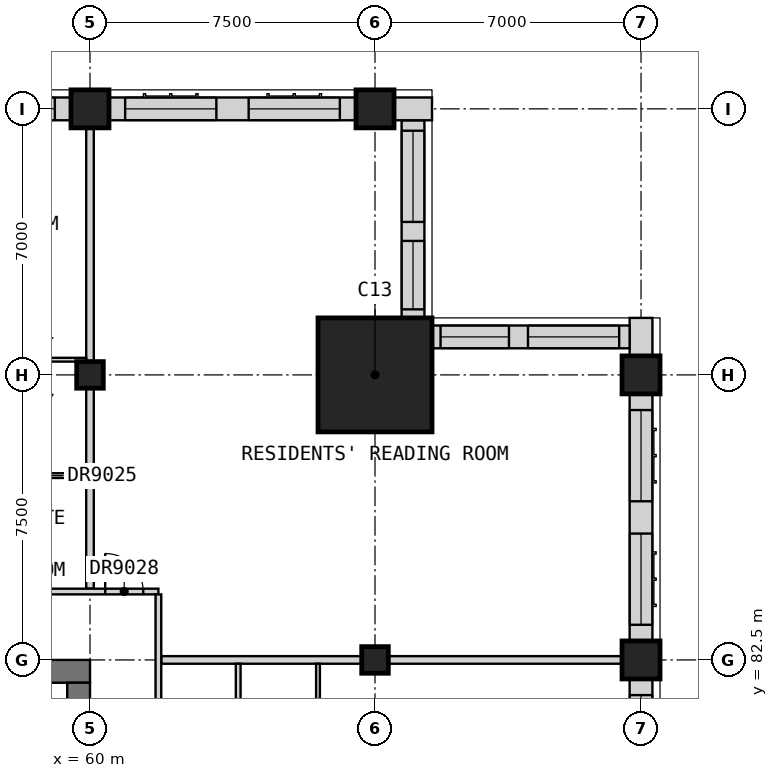
"""IFC4 building model, lengths in metres.
Left out: names, types, materials, properties, quantities, classifications, styles, units other than length and angle.
Written with IfcOpenShell. Run it as: python <this file> out.ifc"""

import sys

from ifc_helpers import new_model, si_unit, direction, frame, frame_2d, origin, origin_2d, place, context, subcontext, project, spatial, rectangle, extrude, element, fill, save


model = new_model("IFC4")
c1 = context("Model", 3, precision=1e-05, world=origin(), true_north=direction((0.0, 1.0)))
c2 = subcontext(c1, "Body", "Model", "MODEL_VIEW")
j1 = project(units=[si_unit("LENGTHUNIT", "METRE"), si_unit("PLANEANGLEUNIT", "RADIAN")], contexts=[c1])
p1 = place(None, origin())
s1 = spatial("IfcSite", under=j1, at=p1, CompositionType="ELEMENT")
p2 = place(p1, origin())
s2 = spatial("IfcBuilding", under=s1, at=p2, CompositionType="ELEMENT")
p3 = place(p2, frame((0.0, 0.0, 269.7)))
s3 = spatial("IfcBuildingStorey", under=s2, at=p3, CompositionType="ELEMENT", Elevation=269.7)
p4 = place(p3, frame((60.0, 90.0, 0.0), z_axis=(0.0, 0.0, 1.0), x_axis=(1.0, 0.0, 0.0)))
e1 = element("IfcColumn", 1, at=p4, inside=s3, PredefinedType="COLUMN", context=c2, shape_type="SweptSolid", body=[
    extrude(rectangle(XDim=0.7, YDim=0.7, at=origin_2d()), origin(), (0.0, 0.0, 1.0), 3.5),
])
p5 = place(p3, frame((60.0, 97.0, 0.0), z_axis=(0.0, 0.0, 1.0), x_axis=(1.0, 0.0, 0.0)))
e2 = element("IfcColumn", 2, at=p5, inside=s3, PredefinedType="COLUMN", context=c2, shape_type="SweptSolid", body=[
    extrude(rectangle(XDim=1.0, YDim=1.0, at=origin_2d()), origin(), (0.0, 0.0, 1.0), 3.5),
])
p6 = place(p3, frame((67.5, 82.5, 0.0), z_axis=(0.0, 0.0, 1.0), x_axis=(1.0, 0.0, 0.0)))
e3 = element("IfcColumn", 3, at=p6, inside=s3, PredefinedType="COLUMN", context=c2, shape_type="SweptSolid", body=[
    extrude(rectangle(XDim=0.7, YDim=0.7, at=origin_2d()), origin(), (0.0, 0.0, 1.0), 3.5),
])
for number, where, z_axis, x_axis in (
    (4, (67.5, 97.0, 0.0), (0.0, 0.0, 1.0), (1.0, 0.0, 0.0)),
    (5, (74.5, 82.5, 0.0), (0.0, 0.0, 1.0), (1.0, 0.0, 0.0)),
    (6, (74.5, 90.0, 0.0), (0.0, 0.0, 1.0), (1.0, 0.0, 0.0)),
):
    element("IfcColumn", number, at=place(p3, frame(where, z_axis=z_axis, x_axis=x_axis)), inside=s3, PredefinedType="COLUMN", context=c2, shape_type="SweptSolid", body=[
        extrude(rectangle(XDim=1.0, YDim=1.0, at=origin_2d()), origin(), (0.0, 0.0, 1.0), 3.5),
    ])
p7 = place(p3, frame((67.5, 90.0, 0.0), z_axis=(0.0, 0.0, 1.0), x_axis=(1.0, 0.0, 0.0)))
e7 = element("IfcColumn", 7, at=p7, inside=s3, PredefinedType="COLUMN", context=c2, shape_type="SweptSolid", body=[
    extrude(rectangle(XDim=3.0, YDim=3.0, at=origin_2d()), origin(), (0.0, 0.0, 1.0), 3.5),
])
p8 = place(p3, frame((30.0, 82.2, 0.0), z_axis=(0.0, 0.0, 1.0), x_axis=(1.0, 0.0, 0.0)))
e8 = element("IfcWall", 8, at=p8, inside=s3, PredefinedType="SHEAR", context=c2, shape_type="SweptSolid", body=[
    extrude(rectangle(XDim=30.0, YDim=0.6, at=frame_2d((15.0, 0.0))), origin(), (0.0, 0.0, 1.0), 3.5),
])
p9 = place(p3, frame((59.7, 60.6, 0.0), z_axis=(0.0, 0.0, 1.0), x_axis=(0.0, 1.0, 0.0)))
e9 = element("IfcWall", 9, at=p9, inside=s3, PredefinedType="SHEAR", context=c2, shape_type="SweptSolid", body=[
    extrude(rectangle(XDim=21.3, YDim=0.6, at=frame_2d((10.65, 0.0))), origin(), (0.0, 0.0, 1.0), 3.5),
])
p10 = place(p9, frame((14.9, 0.0, 0.0)))
e10 = element("IfcOpeningElement", 10, at=p10, cuts=e9, PredefinedType="OPENING", context=c2, shape_type="SweptSolid", body=[
    extrude(rectangle(XDim=1.8, YDim=2.1, at=frame_2d((0.9, 1.05))), frame((0.0, 0.31, 0.0), z_axis=(0.0, -1.0, 0.0), x_axis=(1.0, 0.0, 0.0)), (0.0, 0.0, 1.0), 0.62),
])
p11 = place(p3, frame((74.5, 75.5, 0.0), z_axis=(0.0, 0.0, 1.0), x_axis=(0.0, 1.0, 0.0)))
e11 = element("IfcWall", 11, at=p11, inside=s3, PredefinedType="SOLIDWALL", context=c2, shape_type="SweptSolid", body=[
    extrude(rectangle(XDim=6.5, YDim=0.6, at=frame_2d((3.25, 0.0))), origin(), (0.0, 0.0, 1.0), 2.75),
])
p12 = place(p11, frame((0.425, 0.0, 0.8)))
e12 = element("IfcOpeningElement", 12, at=p12, cuts=e11, PredefinedType="OPENING", context=c2, shape_type="SweptSolid", body=[
    extrude(rectangle(XDim=2.4, YDim=1.8, at=frame_2d((1.2, 0.9))), frame((0.0, 0.31, 0.0), z_axis=(0.0, -1.0, 0.0), x_axis=(1.0, 0.0, 0.0)), (0.0, 0.0, 1.0), 0.62),
])
p13 = place(p11, frame((3.675, 0.0, 0.8)))
e13 = element("IfcOpeningElement", 13, at=p13, cuts=e11, PredefinedType="OPENING", context=c2, shape_type="SweptSolid", body=[
    extrude(rectangle(XDim=2.4, YDim=1.8, at=frame_2d((1.2, 0.9))), frame((0.0, 0.31, 0.0), z_axis=(0.0, -1.0, 0.0), x_axis=(1.0, 0.0, 0.0)), (0.0, 0.0, 1.0), 0.62),
])
p14 = place(p3, frame((74.5, 83.0, 0.0), z_axis=(0.0, 0.0, 1.0), x_axis=(0.0, 1.0, 0.0)))
e14 = element("IfcWall", 14, at=p14, inside=s3, PredefinedType="SOLIDWALL", context=c2, shape_type="SweptSolid", body=[
    extrude(rectangle(XDim=6.5, YDim=0.6, at=frame_2d((3.25, 0.0))), origin(), (0.0, 0.0, 1.0), 2.75),
])
p15 = place(p14, frame((0.425, 0.0, 0.8)))
e15 = element("IfcOpeningElement", 15, at=p15, cuts=e14, PredefinedType="OPENING", context=c2, shape_type="SweptSolid", body=[
    extrude(rectangle(XDim=2.4, YDim=1.8, at=frame_2d((1.2, 0.9))), frame((0.0, 0.31, 0.0), z_axis=(0.0, -1.0, 0.0), x_axis=(1.0, 0.0, 0.0)), (0.0, 0.0, 1.0), 0.62),
])
p16 = place(p14, frame((3.675, 0.0, 0.8)))
e16 = element("IfcOpeningElement", 16, at=p16, cuts=e14, PredefinedType="OPENING", context=c2, shape_type="SweptSolid", body=[
    extrude(rectangle(XDim=2.4, YDim=1.8, at=frame_2d((1.2, 0.9))), frame((0.0, 0.31, 0.0), z_axis=(0.0, -1.0, 0.0), x_axis=(1.0, 0.0, 0.0)), (0.0, 0.0, 1.0), 0.62),
])
p17 = place(p3, frame((74.5, 90.5, 0.0), z_axis=(0.0, 0.0, 1.0), x_axis=(0.0, 1.0, 0.0)))
e17 = element("IfcWall", 17, at=p17, inside=s3, PredefinedType="SOLIDWALL", context=c2, shape_type="SweptSolid", body=[
    extrude(rectangle(XDim=1.0, YDim=0.6, at=frame_2d((0.5, 0.0))), origin(), (0.0, 0.0, 1.0), 3.25),
])
p18 = place(p3, frame((74.2, 91.0, 0.0), z_axis=(0.0, 0.0, 1.0), x_axis=(-1.0, 0.0, 0.0)))
e18 = element("IfcWall", 18, at=p18, inside=s3, PredefinedType="SOLIDWALL", context=c2, shape_type="SweptSolid", body=[
    extrude(rectangle(XDim=5.2, YDim=0.6, at=frame_2d((2.6, 0.0))), origin(), (0.0, 0.0, 1.0), 3.25),
])
p19 = place(p18, frame((3.175, 0.0, 0.8)))
e19 = element("IfcOpeningElement", 19, at=p19, cuts=e18, PredefinedType="OPENING", context=c2, shape_type="SweptSolid", body=[
    extrude(rectangle(XDim=1.8, YDim=1.8, at=frame_2d((0.9, 0.9))), frame((0.0, 0.31, 0.0), z_axis=(0.0, -1.0, 0.0), x_axis=(1.0, 0.0, 0.0)), (0.0, 0.0, 1.0), 0.62),
])
p20 = place(p18, frame((0.275, 0.0, 0.8)))
e20 = element("IfcOpeningElement", 20, at=p20, cuts=e18, PredefinedType="OPENING", context=c2, shape_type="SweptSolid", body=[
    extrude(rectangle(XDim=2.4, YDim=1.8, at=frame_2d((1.2, 0.9))), frame((0.0, 0.31, 0.0), z_axis=(0.0, -1.0, 0.0), x_axis=(1.0, 0.0, 0.0)), (0.0, 0.0, 1.0), 0.62),
])
p21 = place(p3, frame((68.5, 91.5, 0.0), z_axis=(0.0, 0.0, 1.0), x_axis=(0.0, 1.0, 0.0)))
e21 = element("IfcWall", 21, at=p21, inside=s3, PredefinedType="SOLIDWALL", context=c2, shape_type="SweptSolid", body=[
    extrude(rectangle(XDim=5.2, YDim=0.6, at=frame_2d((2.6, 0.0))), origin(), (0.0, 0.0, 1.0), 3.25),
])
p22 = place(p21, frame((0.225, 0.0, 0.8)))
e22 = element("IfcOpeningElement", 22, at=p22, cuts=e21, PredefinedType="OPENING", context=c2, shape_type="SweptSolid", body=[
    extrude(rectangle(XDim=1.8, YDim=1.8, at=frame_2d((0.9, 0.9))), frame((0.0, 0.31, 0.0), z_axis=(0.0, -1.0, 0.0), x_axis=(1.0, 0.0, 0.0)), (0.0, 0.0, 1.0), 0.62),
])
p23 = place(p21, frame((2.525, 0.0, 0.8)))
e23 = element("IfcOpeningElement", 23, at=p23, cuts=e21, PredefinedType="OPENING", context=c2, shape_type="SweptSolid", body=[
    extrude(rectangle(XDim=2.4, YDim=1.8, at=frame_2d((1.2, 0.9))), frame((0.0, 0.31, 0.0), z_axis=(0.0, -1.0, 0.0), x_axis=(1.0, 0.0, 0.0)), (0.0, 0.0, 1.0), 0.62),
])
p24 = place(p3, frame((69.0, 97.0, 0.0), z_axis=(0.0, 0.0, 1.0), x_axis=(-1.0, 0.0, 0.0)))
e24 = element("IfcWall", 24, at=p24, inside=s3, PredefinedType="SOLIDWALL", context=c2, shape_type="SweptSolid", body=[
    extrude(rectangle(XDim=1.0, YDim=0.6, at=frame_2d((0.5, 0.0))), origin(), (0.0, 0.0, 1.0), 3.25),
])
p25 = place(p3, frame((67.0, 97.0, 0.0), z_axis=(0.0, 0.0, 1.0), x_axis=(-1.0, 0.0, 0.0)))
e25 = element("IfcWall", 25, at=p25, inside=s3, PredefinedType="SOLIDWALL", context=c2, shape_type="SweptSolid", body=[
    extrude(rectangle(XDim=6.5, YDim=0.6, at=frame_2d((3.25, 0.0))), origin(), (0.0, 0.0, 1.0), 2.75),
])
p26 = place(p25, frame((3.675, 0.0, 0.8)))
e26 = element("IfcOpeningElement", 26, at=p26, cuts=e25, PredefinedType="OPENING", context=c2, shape_type="SweptSolid", body=[
    extrude(rectangle(XDim=2.4, YDim=1.8, at=frame_2d((1.2, 0.9))), frame((0.0, 0.31, 0.0), z_axis=(0.0, -1.0, 0.0), x_axis=(1.0, 0.0, 0.0)), (0.0, 0.0, 1.0), 0.62),
])
p27 = place(p25, frame((0.425, 0.0, 0.8)))
e27 = element("IfcOpeningElement", 27, at=p27, cuts=e25, PredefinedType="OPENING", context=c2, shape_type="SweptSolid", body=[
    extrude(rectangle(XDim=2.4, YDim=1.8, at=frame_2d((1.2, 0.9))), frame((0.0, 0.31, 0.0), z_axis=(0.0, -1.0, 0.0), x_axis=(1.0, 0.0, 0.0)), (0.0, 0.0, 1.0), 0.62),
])
p28 = place(p3, frame((59.5, 97.0, 0.0), z_axis=(0.0, 0.0, 1.0), x_axis=(-1.0, 0.0, 0.0)))
e28 = element("IfcWall", 28, at=p28, inside=s3, PredefinedType="SOLIDWALL", context=c2, shape_type="SweptSolid", body=[
    extrude(rectangle(XDim=6.5, YDim=0.6, at=frame_2d((3.25, 0.0))), origin(), (0.0, 0.0, 1.0), 2.75),
])
p29 = place(p28, frame((3.675, 0.0, 0.8)))
e29 = element("IfcOpeningElement", 29, at=p29, cuts=e28, PredefinedType="OPENING", context=c2, shape_type="SweptSolid", body=[
    extrude(rectangle(XDim=2.4, YDim=1.8, at=frame_2d((1.2, 0.9))), frame((0.0, 0.31, 0.0), z_axis=(0.0, -1.0, 0.0), x_axis=(1.0, 0.0, 0.0)), (0.0, 0.0, 1.0), 0.62),
])
p30 = place(p28, frame((0.425, 0.0, 0.8)))
e30 = element("IfcOpeningElement", 30, at=p30, cuts=e28, PredefinedType="OPENING", context=c2, shape_type="SweptSolid", body=[
    extrude(rectangle(XDim=2.4, YDim=1.8, at=frame_2d((1.2, 0.9))), frame((0.0, 0.31, 0.0), z_axis=(0.0, -1.0, 0.0), x_axis=(1.0, 0.0, 0.0)), (0.0, 0.0, 1.0), 0.62),
])
for number, where, z_axis, x_axis in (
    (31, (61.875, 82.5, 0.0), (0.0, 0.0, 1.0), (1.0, 0.0, 0.0)),
    (32, (60.0, 84.375, 0.0), (0.0, 0.0, 1.0), (0.0, 1.0, 0.0)),
):
    element("IfcWall", number, at=place(p3, frame(where, z_axis=z_axis, x_axis=x_axis)), inside=s3, PredefinedType="PARTITIONING", context=c2, shape_type="SweptSolid", body=[
        extrude(rectangle(XDim=13.125, YDim=0.2, at=frame_2d((6.562, 0.0))), origin(), (0.0, 0.0, 1.0), 3.25),
    ])
p31 = place(p3, frame((33.75, 84.3, 0.0), z_axis=(0.0, 0.0, 1.0), x_axis=(1.0, 0.0, 0.0)))
e33 = element("IfcWall", 33, at=p31, inside=s3, PredefinedType="PARTITIONING", context=c2, shape_type="SweptSolid", body=[
    extrude(rectangle(XDim=28.05, YDim=0.15, at=frame_2d((14.025, 0.0))), origin(), (0.0, 0.0, 1.0), 3.25),
])
p32 = place(p31, frame((5.125, 0.0, 0.0)))
e34 = element("IfcOpeningElement", 34, at=p32, cuts=e33, PredefinedType="OPENING", context=c2, shape_type="SweptSolid", body=[
    extrude(rectangle(XDim=1.0, YDim=2.1, at=frame_2d((0.5, 1.05))), frame((0.0, 0.085, 0.0), z_axis=(0.0, -1.0, 0.0), x_axis=(1.0, 0.0, 0.0)), (0.0, 0.0, 1.0), 0.17),
])
p33 = place(p31, frame((12.675, 0.0, 0.0)))
e35 = element("IfcOpeningElement", 35, at=p33, cuts=e33, PredefinedType="OPENING", context=c2, shape_type="SweptSolid", body=[
    extrude(rectangle(XDim=0.9, YDim=2.1, at=frame_2d((0.45, 1.05))), frame((0.0, 0.085, 0.0), z_axis=(0.0, -1.0, 0.0), x_axis=(1.0, 0.0, 0.0)), (0.0, 0.0, 1.0), 0.17),
])
p34 = place(p31, frame((26.65, 0.0, 0.0)))
e36 = element("IfcOpeningElement", 36, at=p34, cuts=e33, PredefinedType="OPENING", context=c2, shape_type="SweptSolid", body=[
    extrude(rectangle(XDim=1.0, YDim=2.1, at=frame_2d((0.5, 1.05))), frame((0.0, 0.085, 0.0), z_axis=(0.0, -1.0, 0.0), x_axis=(1.0, 0.0, 0.0)), (0.0, 0.0, 1.0), 0.17),
])
p35 = place(p3, frame((61.8, 58.275, 0.0), z_axis=(0.0, 0.0, 1.0), x_axis=(0.0, 1.0, 0.0)))
e37 = element("IfcWall", 37, at=p35, inside=s3, PredefinedType="PARTITIONING", context=c2, shape_type="SweptSolid", body=[
    extrude(rectangle(XDim=25.95, YDim=0.15, at=frame_2d((12.975, 0.0))), origin(), (0.0, 0.0, 1.0), 3.25),
])
p36 = place(p35, frame((3.15, 0.0, 0.0)))
e38 = element("IfcOpeningElement", 38, at=p36, cuts=e37, PredefinedType="OPENING", context=c2, shape_type="SweptSolid", body=[
    extrude(rectangle(XDim=0.9, YDim=2.1, at=frame_2d((0.45, 1.05))), frame((0.0, 0.085, 0.0), z_axis=(0.0, -1.0, 0.0), x_axis=(1.0, 0.0, 0.0)), (0.0, 0.0, 1.0), 0.17),
])
p37 = place(p35, frame((18.15, 0.0, 0.0)))
e39 = element("IfcOpeningElement", 39, at=p37, cuts=e37, PredefinedType="OPENING", context=c2, shape_type="SweptSolid", body=[
    extrude(rectangle(XDim=0.9, YDim=2.1, at=frame_2d((0.45, 1.05))), frame((0.0, 0.085, 0.0), z_axis=(0.0, -1.0, 0.0), x_axis=(1.0, 0.0, 0.0)), (0.0, 0.0, 1.0), 0.17),
])
p38 = place(p3, frame((45.1, 90.4, 0.0), z_axis=(0.0, 0.0, 1.0), x_axis=(1.0, 0.0, 0.0)))
e40 = element("IfcWall", 40, at=p38, inside=s3, PredefinedType="PARTITIONING", context=c2, shape_type="SweptSolid", body=[
    extrude(rectangle(XDim=14.8, YDim=0.1, at=frame_2d((7.4, 0.0))), origin(), (0.0, 0.0, 1.0), 3.25),
])
p39 = place(p38, frame((1.325, 0.0, 0.0)))
e41 = element("IfcOpeningElement", 41, at=p39, cuts=e40, PredefinedType="OPENING", context=c2, shape_type="SweptSolid", body=[
    extrude(rectangle(XDim=0.9, YDim=2.1, at=frame_2d((0.45, 1.05))), frame((0.0, 0.06, 0.0), z_axis=(0.0, -1.0, 0.0), x_axis=(1.0, 0.0, 0.0)), (0.0, 0.0, 1.0), 0.12),
])
p40 = place(p38, frame((8.825, 0.0, 0.0)))
e42 = element("IfcOpeningElement", 42, at=p40, cuts=e40, PredefinedType="OPENING", context=c2, shape_type="SweptSolid", body=[
    extrude(rectangle(XDim=0.9, YDim=2.1, at=frame_2d((0.45, 1.05))), frame((0.0, 0.06, 0.0), z_axis=(0.0, -1.0, 0.0), x_axis=(1.0, 0.0, 0.0)), (0.0, 0.0, 1.0), 0.12),
])
p41 = place(p38, frame((12.575, 0.0, 0.0)))
e43 = element("IfcOpeningElement", 43, at=p41, cuts=e40, PredefinedType="OPENING", context=c2, shape_type="SweptSolid", body=[
    extrude(rectangle(XDim=0.9, YDim=2.1, at=frame_2d((0.45, 1.05))), frame((0.0, 0.06, 0.0), z_axis=(0.0, -1.0, 0.0), x_axis=(1.0, 0.0, 0.0)), (0.0, 0.0, 1.0), 0.12),
])
p42 = place(p3, frame((66.0, 60.1, 0.0), z_axis=(0.0, 0.0, 1.0), x_axis=(0.0, 1.0, 0.0)))
e44 = element("IfcWall", 44, at=p42, inside=s3, PredefinedType="PARTITIONING", context=c2, shape_type="SweptSolid", body=[
    extrude(rectangle(XDim=22.3, YDim=0.1, at=frame_2d((11.15, 0.0))), origin(), (0.0, 0.0, 1.0), 3.25),
])
p43 = place(p42, frame((1.325, 0.0, 0.0)))
e45 = element("IfcOpeningElement", 45, at=p43, cuts=e44, PredefinedType="OPENING", context=c2, shape_type="SweptSolid", body=[
    extrude(rectangle(XDim=0.9, YDim=2.1, at=frame_2d((0.45, 1.05))), frame((0.0, 0.06, 0.0), z_axis=(0.0, -1.0, 0.0), x_axis=(1.0, 0.0, 0.0)), (0.0, 0.0, 1.0), 0.12),
])
p44 = place(p42, frame((8.825, 0.0, 0.0)))
e46 = element("IfcOpeningElement", 46, at=p44, cuts=e44, PredefinedType="OPENING", context=c2, shape_type="SweptSolid", body=[
    extrude(rectangle(XDim=0.9, YDim=2.1, at=frame_2d((0.45, 1.05))), frame((0.0, 0.06, 0.0), z_axis=(0.0, -1.0, 0.0), x_axis=(1.0, 0.0, 0.0)), (0.0, 0.0, 1.0), 0.12),
])
p45 = place(p42, frame((12.575, 0.0, 0.0)))
e47 = element("IfcOpeningElement", 47, at=p45, cuts=e44, PredefinedType="OPENING", context=c2, shape_type="SweptSolid", body=[
    extrude(rectangle(XDim=0.9, YDim=2.1, at=frame_2d((0.45, 1.05))), frame((0.0, 0.06, 0.0), z_axis=(0.0, -1.0, 0.0), x_axis=(1.0, 0.0, 0.0)), (0.0, 0.0, 1.0), 0.12),
])
p46 = place(p42, frame((16.325, 0.0, 0.0)))
e48 = element("IfcOpeningElement", 48, at=p46, cuts=e44, PredefinedType="OPENING", context=c2, shape_type="SweptSolid", body=[
    extrude(rectangle(XDim=0.9, YDim=2.1, at=frame_2d((0.45, 1.05))), frame((0.0, 0.06, 0.0), z_axis=(0.0, -1.0, 0.0), x_axis=(1.0, 0.0, 0.0)), (0.0, 0.0, 1.0), 0.12),
])
p47 = place(p3, frame((56.25, 87.35, 0.0), z_axis=(0.0, 0.0, 1.0), x_axis=(1.0, 0.0, 0.0)))
e49 = element("IfcWall", 49, at=p47, inside=s3, PredefinedType="PARTITIONING", context=c2, shape_type="SweptSolid", body=[
    extrude(rectangle(XDim=3.65, YDim=0.125, at=frame_2d((1.825, 0.0))), origin(), (0.0, 0.0, 1.0), 3.25),
])
p48 = place(p47, frame((1.425, 0.0, 0.0)))
e50 = element("IfcOpeningElement", 50, at=p48, cuts=e49, PredefinedType="OPENING", context=c2, shape_type="SweptSolid", body=[
    extrude(rectangle(XDim=0.9, YDim=2.1, at=frame_2d((0.45, 1.05))), frame((0.0, 0.073, 0.0), z_axis=(0.0, -1.0, 0.0), x_axis=(1.0, 0.0, 0.0)), (0.0, 0.0, 1.0), 0.145),
])
p49 = place(p3, frame((63.9, 78.812, 0.0), z_axis=(0.0, 0.0, 1.0), x_axis=(0.0, 1.0, 0.0)))
e51 = element("IfcWall", 51, at=p49, inside=s3, PredefinedType="PARTITIONING", context=c2, shape_type="SweptSolid", body=[
    extrude(rectangle(XDim=3.587, YDim=0.125, at=frame_2d((1.794, 0.0))), origin(), (0.0, 0.0, 1.0), 3.25),
])
p50 = place(p13, origin())
e52 = element("IfcWindow", 52, at=p50, inside=s3, PartitioningType="SINGLE_PANEL", PredefinedType="WINDOW", context=c2, shape_type="SweptSolid", body=[
    extrude(rectangle(XDim=2.4, YDim=1.8, at=frame_2d((1.2, 0.9))), frame((0.0, -0.07, 0.0), z_axis=(0.0, -1.0, 0.0), x_axis=(1.0, 0.0, 0.0)), (0.0, 0.0, 1.0), 0.06),
])
fill(e13, e52)
p51 = place(p15, origin())
e53 = element("IfcWindow", 53, at=p51, inside=s3, PartitioningType="SINGLE_PANEL", PredefinedType="WINDOW", context=c2, shape_type="SweptSolid", body=[
    extrude(rectangle(XDim=2.4, YDim=1.8, at=frame_2d((1.2, 0.9))), frame((0.0, -0.07, 0.0), z_axis=(0.0, -1.0, 0.0), x_axis=(1.0, 0.0, 0.0)), (0.0, 0.0, 1.0), 0.06),
])
fill(e15, e53)
p52 = place(p16, origin())
e54 = element("IfcWindow", 54, at=p52, inside=s3, PartitioningType="SINGLE_PANEL", PredefinedType="WINDOW", context=c2, shape_type="SweptSolid", body=[
    extrude(rectangle(XDim=2.4, YDim=1.8, at=frame_2d((1.2, 0.9))), frame((0.0, -0.07, 0.0), z_axis=(0.0, -1.0, 0.0), x_axis=(1.0, 0.0, 0.0)), (0.0, 0.0, 1.0), 0.06),
])
fill(e16, e54)
p53 = place(p19, origin())
e55 = element("IfcWindow", 55, at=p53, inside=s3, PartitioningType="SINGLE_PANEL", PredefinedType="WINDOW", context=c2, shape_type="SweptSolid", body=[
    extrude(rectangle(XDim=1.8, YDim=1.8, at=frame_2d((0.9, 0.9))), frame((0.0, -0.07, 0.0), z_axis=(0.0, -1.0, 0.0), x_axis=(1.0, 0.0, 0.0)), (0.0, 0.0, 1.0), 0.06),
])
fill(e19, e55)
p54 = place(p20, origin())
e56 = element("IfcWindow", 56, at=p54, inside=s3, PartitioningType="SINGLE_PANEL", PredefinedType="WINDOW", context=c2, shape_type="SweptSolid", body=[
    extrude(rectangle(XDim=2.4, YDim=1.8, at=frame_2d((1.2, 0.9))), frame((0.0, -0.07, 0.0), z_axis=(0.0, -1.0, 0.0), x_axis=(1.0, 0.0, 0.0)), (0.0, 0.0, 1.0), 0.06),
])
fill(e20, e56)
p55 = place(p22, origin())
e57 = element("IfcWindow", 57, at=p55, inside=s3, PartitioningType="SINGLE_PANEL", PredefinedType="WINDOW", context=c2, shape_type="SweptSolid", body=[
    extrude(rectangle(XDim=1.8, YDim=1.8, at=frame_2d((0.9, 0.9))), frame((0.0, -0.07, 0.0), z_axis=(0.0, -1.0, 0.0), x_axis=(1.0, 0.0, 0.0)), (0.0, 0.0, 1.0), 0.06),
])
fill(e22, e57)
p56 = place(p23, origin())
e58 = element("IfcWindow", 58, at=p56, inside=s3, PartitioningType="SINGLE_PANEL", PredefinedType="WINDOW", context=c2, shape_type="SweptSolid", body=[
    extrude(rectangle(XDim=2.4, YDim=1.8, at=frame_2d((1.2, 0.9))), frame((0.0, -0.07, 0.0), z_axis=(0.0, -1.0, 0.0), x_axis=(1.0, 0.0, 0.0)), (0.0, 0.0, 1.0), 0.06),
])
fill(e23, e58)
p57 = place(p26, origin())
e59 = element("IfcWindow", 59, at=p57, inside=s3, PartitioningType="SINGLE_PANEL", PredefinedType="WINDOW", context=c2, shape_type="SweptSolid", body=[
    extrude(rectangle(XDim=2.4, YDim=1.8, at=frame_2d((1.2, 0.9))), frame((0.0, -0.07, 0.0), z_axis=(0.0, -1.0, 0.0), x_axis=(1.0, 0.0, 0.0)), (0.0, 0.0, 1.0), 0.06),
])
fill(e26, e59)
p58 = place(p27, origin())
e60 = element("IfcWindow", 60, at=p58, inside=s3, PartitioningType="SINGLE_PANEL", PredefinedType="WINDOW", context=c2, shape_type="SweptSolid", body=[
    extrude(rectangle(XDim=2.4, YDim=1.8, at=frame_2d((1.2, 0.9))), frame((0.0, -0.07, 0.0), z_axis=(0.0, -1.0, 0.0), x_axis=(1.0, 0.0, 0.0)), (0.0, 0.0, 1.0), 0.06),
])
fill(e27, e60)
p59 = place(p30, origin())
e61 = element("IfcWindow", 61, at=p59, inside=s3, PartitioningType="SINGLE_PANEL", PredefinedType="WINDOW", context=c2, shape_type="SweptSolid", body=[
    extrude(rectangle(XDim=2.4, YDim=1.8, at=frame_2d((1.2, 0.9))), frame((0.0, -0.07, 0.0), z_axis=(0.0, -1.0, 0.0), x_axis=(1.0, 0.0, 0.0)), (0.0, 0.0, 1.0), 0.06),
])
fill(e30, e61)
p60 = place(p34, origin())
e62 = element("IfcDoor", 62, at=p60, inside=s3, OperationType="SINGLE_SWING_LEFT", PredefinedType="DOOR", context=c2, shape_type="SweptSolid", body=[
    extrude(rectangle(XDim=1.0, YDim=2.1, at=frame_2d((0.5, 1.05))), frame((0.0, 0.025, 0.0), z_axis=(0.0, -1.0, 0.0), x_axis=(1.0, 0.0, 0.0)), (0.0, 0.0, 1.0), 0.05),
])
fill(e36, e62)
save(model, sys.argv[1])
